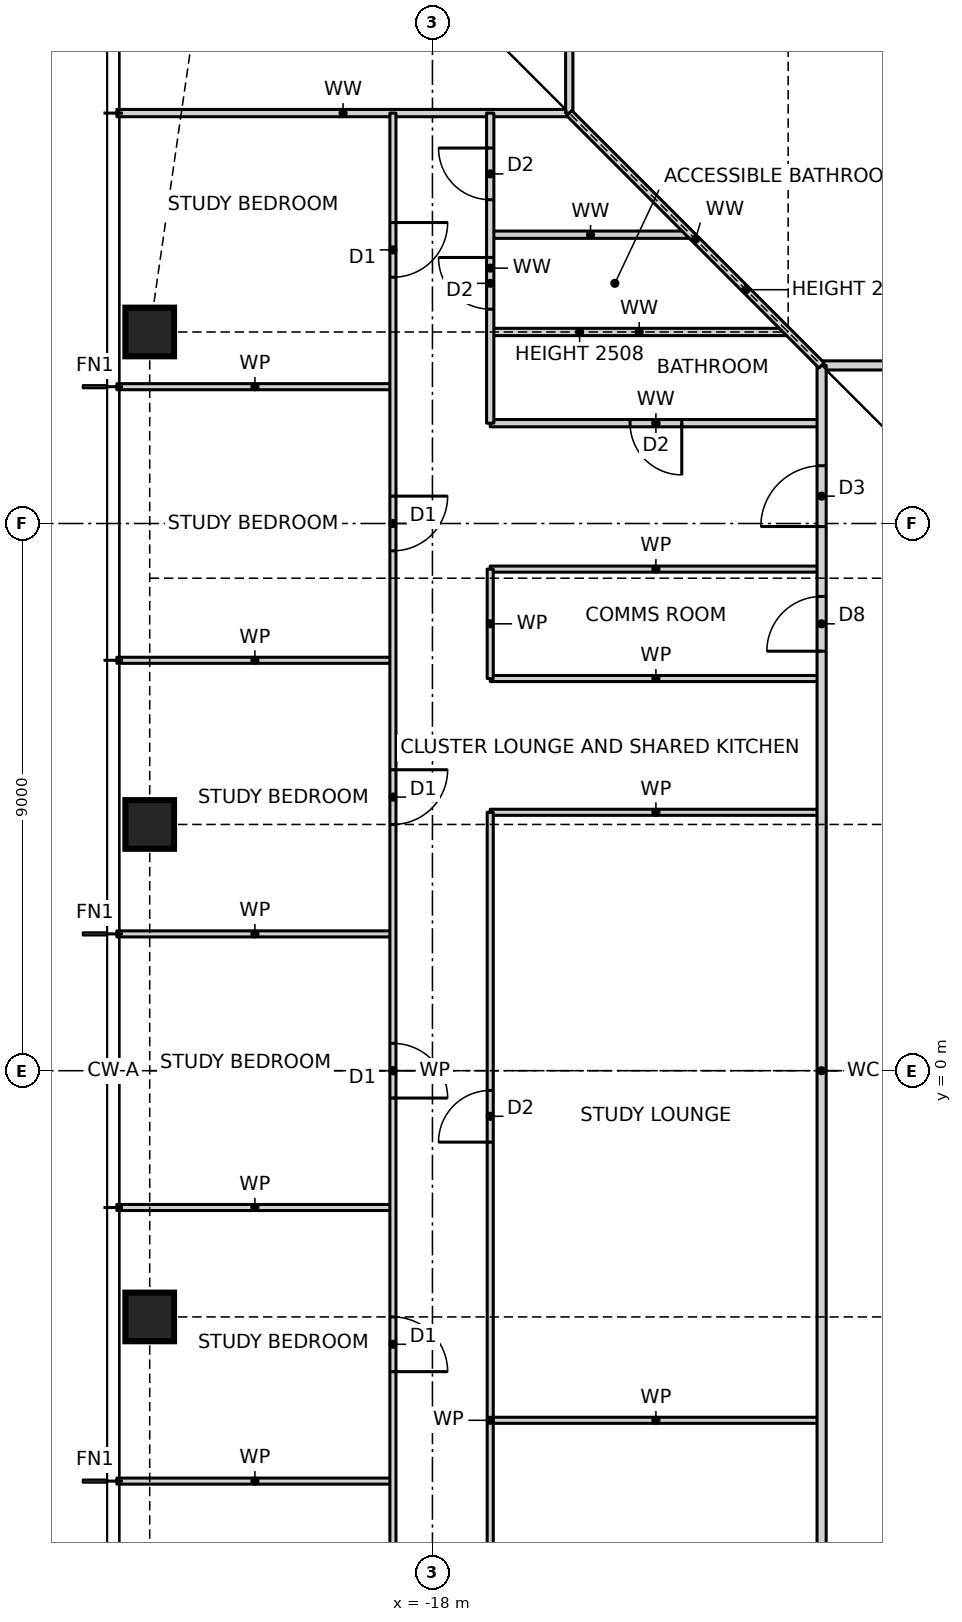
"""IFC4 building model, lengths in metres.
Left out: names, types, materials, properties, quantities, classifications, styles, units other than length and angle.
Written with IfcOpenShell. Run it as: python <this file> out.ifc"""

import sys

from ifc_helpers import new_model, si_unit, direction, frame, frame_2d, origin, origin_2d, place, context, subcontext, project, spatial, rectangle, hollow_rectangle, extrude, element, fill, save


model = new_model("IFC4")
c1 = context("Model", 3, precision=1e-05, world=origin(), true_north=direction((0.0, 1.0)))
c2 = subcontext(c1, "Body", "Model", "MODEL_VIEW")
j1 = project(units=[si_unit("LENGTHUNIT", "METRE"), si_unit("PLANEANGLEUNIT", "RADIAN")], contexts=[c1])
p1 = place(None, origin())
s1 = spatial("IfcSite", under=j1, at=p1, CompositionType="ELEMENT")
p2 = place(p1, origin())
s2 = spatial("IfcBuilding", under=s1, at=p2, CompositionType="ELEMENT")
p3 = place(p2, frame((0.0, 0.0, 29.0)))
s3 = spatial("IfcBuildingStorey", under=s2, at=p3, CompositionType="ELEMENT", Elevation=29.0)
for number, where, z_axis, x_axis in (
    (1, (-22.65, 12.15, 0.0), (0.0, 0.0, 1.0), (1.0, 0.0, 0.0)),
    (2, (-22.65, 4.05, 0.0), (0.0, 0.0, 1.0), (1.0, 0.0, 0.0)),
    (3, (-22.65, -4.05, 0.0), (0.0, 0.0, 1.0), (1.0, 0.0, 0.0)),
):
    element("IfcColumn", number, at=place(p3, frame(where, z_axis=z_axis, x_axis=x_axis)), inside=s3, PredefinedType="COLUMN", context=c2, shape_type="SweptSolid", body=[
        extrude(hollow_rectangle(XDim=0.8, YDim=0.8, WallThickness=0.09, at=origin_2d()), origin(), (0.0, 0.0, 1.0), 3.5),
    ])
p4 = place(p3, frame((-23.19, -6.75, 0.0), z_axis=(0.0, 0.0, 1.0), x_axis=(1.0, 0.0, 0.0)))
e4 = element("IfcWall", 4, at=p4, inside=s3, PredefinedType="PARTITIONING", context=c2, shape_type="SweptSolid", body=[
    extrude(rectangle(XDim=4.54, YDim=0.1, at=frame_2d((2.27, 0.0))), origin(), (0.0, 0.0, 1.0), 3.27),
])
p5 = place(p3, frame((-17.05, -5.75, 0.0), z_axis=(0.0, 0.0, 1.0), x_axis=(1.0, 0.0, 0.0)))
e5 = element("IfcWall", 5, at=p5, inside=s3, PredefinedType="PARTITIONING", context=c2, shape_type="SweptSolid", body=[
    extrude(rectangle(XDim=5.45, YDim=0.1, at=frame_2d((2.725, 0.0))), origin(), (0.0, 0.0, 1.0), 3.27),
])
for number, where, z_axis, x_axis in (
    (6, (-23.19, -2.25, 0.0), (0.0, 0.0, 1.0), (1.0, 0.0, 0.0)),
    (7, (-23.19, 2.25, 0.0), (0.0, 0.0, 1.0), (1.0, 0.0, 0.0)),
):
    element("IfcWall", number, at=place(p3, frame(where, z_axis=z_axis, x_axis=x_axis)), inside=s3, PredefinedType="PARTITIONING", context=c2, shape_type="SweptSolid", body=[
        extrude(rectangle(XDim=4.54, YDim=0.1, at=frame_2d((2.27, 0.0))), origin(), (0.0, 0.0, 1.0), 3.27),
    ])
for number, where, z_axis, x_axis in (
    (8, (-17.05, 4.25, 0.0), (0.0, 0.0, 1.0), (1.0, 0.0, 0.0)),
    (9, (-17.05, 6.45, 0.0), (0.0, 0.0, 1.0), (1.0, 0.0, 0.0)),
):
    element("IfcWall", number, at=place(p3, frame(where, z_axis=z_axis, x_axis=x_axis)), inside=s3, PredefinedType="PARTITIONING", context=c2, shape_type="SweptSolid", body=[
        extrude(rectangle(XDim=5.45, YDim=0.1, at=frame_2d((2.725, 0.0))), origin(), (0.0, 0.0, 1.0), 3.27),
    ])
p6 = place(p3, frame((-23.19, 6.75, 0.0), z_axis=(0.0, 0.0, 1.0), x_axis=(1.0, 0.0, 0.0)))
e10 = element("IfcWall", 10, at=p6, inside=s3, PredefinedType="PARTITIONING", context=c2, shape_type="SweptSolid", body=[
    extrude(rectangle(XDim=4.54, YDim=0.1, at=frame_2d((2.27, 0.0))), origin(), (0.0, 0.0, 1.0), 3.27),
])
p7 = place(p3, frame((-17.05, 8.25, 0.0), z_axis=(0.0, 0.0, 1.0), x_axis=(1.0, 0.0, 0.0)))
e11 = element("IfcWall", 11, at=p7, inside=s3, PredefinedType="PARTITIONING", context=c2, shape_type="SweptSolid", body=[
    extrude(rectangle(XDim=5.45, YDim=0.1, at=frame_2d((2.725, 0.0))), origin(), (0.0, 0.0, 1.0), 3.27),
])
p8 = place(p3, frame((-17.05, 10.65, 0.0), z_axis=(0.0, 0.0, 1.0), x_axis=(1.0, 0.0, 0.0)))
e12 = element("IfcWall", 12, at=p8, inside=s3, PredefinedType="PARTITIONING", context=c2, shape_type="SweptSolid", body=[
    extrude(rectangle(XDim=5.45, YDim=0.12, at=frame_2d((2.725, 0.0))), origin(), (0.0, 0.0, 1.0), 3.27),
])
p9 = place(p8, frame((2.3, 0.0, 0.0)))
e13 = element("IfcOpeningElement", 13, at=p9, cuts=e12, PredefinedType="OPENING", context=c2, shape_type="SweptSolid", body=[
    extrude(rectangle(XDim=0.85, YDim=2.1, at=frame_2d((0.425, 1.05))), frame((0.0, 0.07, 0.0), z_axis=(0.0, -1.0, 0.0), x_axis=(1.0, 0.0, 0.0)), (0.0, 0.0, 1.0), 0.14),
])
p10 = place(p3, frame((-23.19, 11.25, 0.0), z_axis=(0.0, 0.0, 1.0), x_axis=(1.0, 0.0, 0.0)))
e14 = element("IfcWall", 14, at=p10, inside=s3, PredefinedType="PARTITIONING", context=c2, shape_type="SweptSolid", body=[
    extrude(rectangle(XDim=4.54, YDim=0.1, at=frame_2d((2.27, 0.0))), origin(), (0.0, 0.0, 1.0), 3.27),
])
p11 = place(p3, frame((-11.6, 11.6, 0.0), z_axis=(0.0, 0.0, 1.0), x_axis=(1.0, 0.0, 0.0)))
e15 = element("IfcWall", 15, at=p11, inside=s3, PredefinedType="PARTITIONING", context=c2, shape_type="SweptSolid", body=[
    extrude(rectangle(XDim=24.2, YDim=0.15, at=frame_2d((12.1, 0.0))), origin(), (0.0, 0.0, 1.0), 3.27),
])
p12 = place(p11, frame((12.855, 0.0, 0.0)))
e16 = element("IfcOpeningElement", 16, at=p12, cuts=e15, PredefinedType="OPENING", context=c2, shape_type="SweptSolid", body=[
    extrude(rectangle(XDim=1.0, YDim=2.1, at=frame_2d((0.5, 1.05))), frame((0.0, 0.085, 0.0), z_axis=(0.0, -1.0, 0.0), x_axis=(1.0, 0.0, 0.0)), (0.0, 0.0, 1.0), 0.17),
])
p13 = place(p3, frame((-17.05, 12.15, 0.0), z_axis=(0.0, 0.0, 1.0), x_axis=(1.0, 0.0, 0.0)))
e17 = element("IfcWall", 17, at=p13, inside=s3, PredefinedType="PARTITIONING", context=c2, shape_type="SweptSolid", body=[
    extrude(rectangle(XDim=4.9, YDim=0.12, at=frame_2d((2.45, 0.0))), origin(), (0.0, 0.0, 1.0), 2.508),
])
p14 = place(p3, frame((-17.05, 13.75, 0.0), z_axis=(0.0, 0.0, 1.0), x_axis=(1.0, 0.0, 0.0)))
e18 = element("IfcWall", 18, at=p14, inside=s3, PredefinedType="PARTITIONING", context=c2, shape_type="SweptSolid", body=[
    extrude(rectangle(XDim=3.3, YDim=0.12, at=frame_2d((1.65, 0.0))), origin(), (0.0, 0.0, 1.0), 3.27),
])
p15 = place(p3, frame((-23.19, 15.75, 0.0), z_axis=(0.0, 0.0, 1.0), x_axis=(1.0, 0.0, 0.0)))
e19 = element("IfcWall", 19, at=p15, inside=s3, PredefinedType="PARTITIONING", context=c2, shape_type="SweptSolid", body=[
    extrude(rectangle(XDim=7.44, YDim=0.12, at=frame_2d((3.72, 0.0))), origin(), (0.0, 0.0, 1.0), 3.27),
])
p16 = place(p3, frame((-11.6, -11.6, 0.0), z_axis=(0.0, 0.0, 1.0), x_axis=(0.0, 1.0, 0.0)))
e20 = element("IfcWall", 20, at=p16, inside=s3, PredefinedType="PARTITIONING", context=c2, shape_type="SweptSolid", body=[
    extrude(rectangle(XDim=23.2, YDim=0.15, at=frame_2d((11.6, 0.0))), origin(), (0.0, 0.0, 1.0), 3.27),
])
p17 = place(p16, frame((20.55, 0.0, 0.0)))
e21 = element("IfcOpeningElement", 21, at=p17, cuts=e20, PredefinedType="OPENING", context=c2, shape_type="SweptSolid", body=[
    extrude(rectangle(XDim=1.0, YDim=2.1, at=frame_2d((0.5, 1.05))), frame((0.0, 0.085, 0.0), z_axis=(0.0, -1.0, 0.0), x_axis=(1.0, 0.0, 0.0)), (0.0, 0.0, 1.0), 0.17),
])
p18 = place(p16, frame((18.5, 0.0, 0.0)))
e22 = element("IfcOpeningElement", 22, at=p18, cuts=e20, PredefinedType="OPENING", context=c2, shape_type="SweptSolid", body=[
    extrude(rectangle(XDim=0.9, YDim=2.1, at=frame_2d((0.45, 1.05))), frame((0.0, 0.085, 0.0), z_axis=(0.0, -1.0, 0.0), x_axis=(1.0, 0.0, 0.0)), (0.0, 0.0, 1.0), 0.17),
])
p19 = place(p3, frame((-15.75, 15.75, 0.0), z_axis=(0.0, 0.0, 1.0), x_axis=(0.0, 1.0, 0.0)))
e23 = element("IfcWall", 23, at=p19, inside=s3, PredefinedType="PARTITIONING", context=c2, shape_type="SweptSolid", body=[
    extrude(rectangle(XDim=7.44, YDim=0.12, at=frame_2d((3.72, 0.0))), origin(), (0.0, 0.0, 1.0), 3.27),
])
p20 = place(p19, frame((1.675, 0.0, 0.0)))
e24 = element("IfcOpeningElement", 24, at=p20, cuts=e23, PredefinedType="OPENING", context=c2, shape_type="SweptSolid", body=[
    extrude(rectangle(XDim=0.85, YDim=2.1, at=frame_2d((0.425, 1.05))), frame((0.0, 0.07, 0.0), z_axis=(0.0, -1.0, 0.0), x_axis=(1.0, 0.0, 0.0)), (0.0, 0.0, 1.0), 0.14),
])
p21 = place(p3, frame((-17.05, -15.75, 0.0), z_axis=(0.0, 0.0, 1.0), x_axis=(0.0, 1.0, 0.0)))
e25 = element("IfcWall", 25, at=p21, inside=s3, PredefinedType="PARTITIONING", context=c2, shape_type="SweptSolid", body=[
    extrude(rectangle(XDim=20.0, YDim=0.1, at=frame_2d((10.0, 0.0))), origin(), (0.0, 0.0, 1.0), 3.27),
])
p22 = place(p21, frame((14.575, 0.0, 0.0)))
e26 = element("IfcOpeningElement", 26, at=p22, cuts=e25, PredefinedType="OPENING", context=c2, shape_type="SweptSolid", body=[
    extrude(rectangle(XDim=0.85, YDim=2.1, at=frame_2d((0.425, 1.05))), frame((0.0, 0.06, 0.0), z_axis=(0.0, -1.0, 0.0), x_axis=(1.0, 0.0, 0.0)), (0.0, 0.0, 1.0), 0.12),
])
p23 = place(p21, frame((4.575, 0.0, 0.0)))
e27 = element("IfcOpeningElement", 27, at=p23, cuts=e25, PredefinedType="OPENING", context=c2, shape_type="SweptSolid", body=[
    extrude(rectangle(XDim=0.85, YDim=2.1, at=frame_2d((0.425, 1.05))), frame((0.0, 0.06, 0.0), z_axis=(0.0, -1.0, 0.0), x_axis=(1.0, 0.0, 0.0)), (0.0, 0.0, 1.0), 0.12),
])
p24 = place(p3, frame((-17.05, 6.45, 0.0), z_axis=(0.0, 0.0, 1.0), x_axis=(0.0, 1.0, 0.0)))
e28 = element("IfcWall", 28, at=p24, inside=s3, PredefinedType="PARTITIONING", context=c2, shape_type="SweptSolid", body=[
    extrude(rectangle(XDim=1.8, YDim=0.1, at=frame_2d((0.9, 0.0))), origin(), (0.0, 0.0, 1.0), 3.27),
])
p25 = place(p3, frame((-17.05, 10.65, 0.0), z_axis=(0.0, 0.0, 1.0), x_axis=(0.0, 1.0, 0.0)))
e29 = element("IfcWall", 29, at=p25, inside=s3, PredefinedType="PARTITIONING", context=c2, shape_type="SweptSolid", body=[
    extrude(rectangle(XDim=5.1, YDim=0.12, at=frame_2d((2.55, 0.0))), origin(), (0.0, 0.0, 1.0), 3.27),
])
p26 = place(p25, frame((3.675, 0.0, 0.0)))
e30 = element("IfcOpeningElement", 30, at=p26, cuts=e29, PredefinedType="OPENING", context=c2, shape_type="SweptSolid", body=[
    extrude(rectangle(XDim=0.85, YDim=2.1, at=frame_2d((0.425, 1.05))), frame((0.0, 0.07, 0.0), z_axis=(0.0, -1.0, 0.0), x_axis=(1.0, 0.0, 0.0)), (0.0, 0.0, 1.0), 0.14),
])
p27 = place(p25, frame((1.875, 0.0, 0.0)))
e31 = element("IfcOpeningElement", 31, at=p27, cuts=e29, PredefinedType="OPENING", context=c2, shape_type="SweptSolid", body=[
    extrude(rectangle(XDim=0.85, YDim=2.1, at=frame_2d((0.425, 1.05))), frame((0.0, 0.07, 0.0), z_axis=(0.0, -1.0, 0.0), x_axis=(1.0, 0.0, 0.0)), (0.0, 0.0, 1.0), 0.14),
])
p28 = place(p3, frame((-18.65, -15.75, 0.0), z_axis=(0.0, 0.0, 1.0), x_axis=(0.0, 1.0, 0.0)))
e32 = element("IfcWall", 32, at=p28, inside=s3, PredefinedType="PARTITIONING", context=c2, shape_type="SweptSolid", body=[
    extrude(rectangle(XDim=31.5, YDim=0.1, at=frame_2d((15.75, 0.0))), origin(), (0.0, 0.0, 1.0), 3.27),
])
p29 = place(p28, frame((28.8, 0.0, 0.0)))
e33 = element("IfcOpeningElement", 33, at=p29, cuts=e32, PredefinedType="OPENING", context=c2, shape_type="SweptSolid", body=[
    extrude(rectangle(XDim=0.9, YDim=2.1, at=frame_2d((0.45, 1.05))), frame((0.0, 0.06, 0.0), z_axis=(0.0, -1.0, 0.0), x_axis=(1.0, 0.0, 0.0)), (0.0, 0.0, 1.0), 0.12),
])
p30 = place(p28, frame((24.3, 0.0, 0.0)))
e34 = element("IfcOpeningElement", 34, at=p30, cuts=e32, PredefinedType="OPENING", context=c2, shape_type="SweptSolid", body=[
    extrude(rectangle(XDim=0.9, YDim=2.1, at=frame_2d((0.45, 1.05))), frame((0.0, 0.06, 0.0), z_axis=(0.0, -1.0, 0.0), x_axis=(1.0, 0.0, 0.0)), (0.0, 0.0, 1.0), 0.12),
])
p31 = place(p28, frame((19.8, 0.0, 0.0)))
e35 = element("IfcOpeningElement", 35, at=p31, cuts=e32, PredefinedType="OPENING", context=c2, shape_type="SweptSolid", body=[
    extrude(rectangle(XDim=0.9, YDim=2.1, at=frame_2d((0.45, 1.05))), frame((0.0, 0.06, 0.0), z_axis=(0.0, -1.0, 0.0), x_axis=(1.0, 0.0, 0.0)), (0.0, 0.0, 1.0), 0.12),
])
p32 = place(p28, frame((15.3, 0.0, 0.0)))
e36 = element("IfcOpeningElement", 36, at=p32, cuts=e32, PredefinedType="OPENING", context=c2, shape_type="SweptSolid", body=[
    extrude(rectangle(XDim=0.9, YDim=2.1, at=frame_2d((0.45, 1.05))), frame((0.0, 0.06, 0.0), z_axis=(0.0, -1.0, 0.0), x_axis=(1.0, 0.0, 0.0)), (0.0, 0.0, 1.0), 0.12),
])
p33 = place(p28, frame((10.8, 0.0, 0.0)))
e37 = element("IfcOpeningElement", 37, at=p33, cuts=e32, PredefinedType="OPENING", context=c2, shape_type="SweptSolid", body=[
    extrude(rectangle(XDim=0.9, YDim=2.1, at=frame_2d((0.45, 1.05))), frame((0.0, 0.06, 0.0), z_axis=(0.0, -1.0, 0.0), x_axis=(1.0, 0.0, 0.0)), (0.0, 0.0, 1.0), 0.12),
])
p34 = place(p28, frame((6.3, 0.0, 0.0)))
e38 = element("IfcOpeningElement", 38, at=p34, cuts=e32, PredefinedType="OPENING", context=c2, shape_type="SweptSolid", body=[
    extrude(rectangle(XDim=0.9, YDim=2.1, at=frame_2d((0.45, 1.05))), frame((0.0, 0.06, 0.0), z_axis=(0.0, -1.0, 0.0), x_axis=(1.0, 0.0, 0.0)), (0.0, 0.0, 1.0), 0.12),
])
p35 = place(p28, frame((1.8, 0.0, 0.0)))
e39 = element("IfcOpeningElement", 39, at=p35, cuts=e32, PredefinedType="OPENING", context=c2, shape_type="SweptSolid", body=[
    extrude(rectangle(XDim=0.9, YDim=2.1, at=frame_2d((0.45, 1.05))), frame((0.0, 0.06, 0.0), z_axis=(0.0, -1.0, 0.0), x_axis=(1.0, 0.0, 0.0)), (0.0, 0.0, 1.0), 0.12),
])
p36 = place(p3, frame((-11.6, 11.6, 0.0), z_axis=(0.0, 0.0, 1.0), x_axis=(-0.707106781187, 0.707106781187, 0.0)))
e40 = element("IfcWall", 40, at=p36, inside=s3, PredefinedType="PARTITIONING", context=c2, shape_type="SweptSolid", body=[
    extrude(rectangle(XDim=5.869, YDim=0.12, at=frame_2d((2.935, 0.0))), origin(), (0.0, 0.0, 1.0), 2.343),
])
p37 = place(p29, frame((0.9, 0.0, 0.0), z_axis=(0.0, 0.0, 1.0), x_axis=(-1.0, 0.0, 0.0)))
e41 = element("IfcDoor", 41, at=p37, inside=s3, OperationType="SINGLE_SWING_LEFT", PredefinedType="DOOR", context=c2, shape_type="SweptSolid", body=[
    extrude(rectangle(XDim=0.9, YDim=2.1, at=frame_2d((0.45, 1.05))), frame((0.0, 0.025, 0.0), z_axis=(0.0, -1.0, 0.0), x_axis=(1.0, 0.0, 0.0)), (0.0, 0.0, 1.0), 0.05),
])
fill(e33, e41)
p38 = place(p30, frame((0.9, 0.0, 0.0), z_axis=(0.0, 0.0, 1.0), x_axis=(-1.0, 0.0, 0.0)))
e42 = element("IfcDoor", 42, at=p38, inside=s3, OperationType="SINGLE_SWING_LEFT", PredefinedType="DOOR", context=c2, shape_type="SweptSolid", body=[
    extrude(rectangle(XDim=0.9, YDim=2.1, at=frame_2d((0.45, 1.05))), frame((0.0, 0.025, 0.0), z_axis=(0.0, -1.0, 0.0), x_axis=(1.0, 0.0, 0.0)), (0.0, 0.0, 1.0), 0.05),
])
fill(e34, e42)
p39 = place(p31, frame((0.9, 0.0, 0.0), z_axis=(0.0, 0.0, 1.0), x_axis=(-1.0, 0.0, 0.0)))
e43 = element("IfcDoor", 43, at=p39, inside=s3, OperationType="SINGLE_SWING_LEFT", PredefinedType="DOOR", context=c2, shape_type="SweptSolid", body=[
    extrude(rectangle(XDim=0.9, YDim=2.1, at=frame_2d((0.45, 1.05))), frame((0.0, 0.025, 0.0), z_axis=(0.0, -1.0, 0.0), x_axis=(1.0, 0.0, 0.0)), (0.0, 0.0, 1.0), 0.05),
])
fill(e35, e43)
p40 = place(p32, frame((0.9, 0.0, 0.0), z_axis=(0.0, 0.0, 1.0), x_axis=(-1.0, 0.0, 0.0)))
e44 = element("IfcDoor", 44, at=p40, inside=s3, OperationType="SINGLE_SWING_RIGHT", PredefinedType="DOOR", context=c2, shape_type="SweptSolid", body=[
    extrude(rectangle(XDim=0.9, YDim=2.1, at=frame_2d((0.45, 1.05))), frame((0.0, 0.025, 0.0), z_axis=(0.0, -1.0, 0.0), x_axis=(1.0, 0.0, 0.0)), (0.0, 0.0, 1.0), 0.05),
])
fill(e36, e44)
p41 = place(p33, frame((0.9, 0.0, 0.0), z_axis=(0.0, 0.0, 1.0), x_axis=(-1.0, 0.0, 0.0)))
e45 = element("IfcDoor", 45, at=p41, inside=s3, OperationType="SINGLE_SWING_RIGHT", PredefinedType="DOOR", context=c2, shape_type="SweptSolid", body=[
    extrude(rectangle(XDim=0.9, YDim=2.1, at=frame_2d((0.45, 1.05))), frame((0.0, 0.025, 0.0), z_axis=(0.0, -1.0, 0.0), x_axis=(1.0, 0.0, 0.0)), (0.0, 0.0, 1.0), 0.05),
])
fill(e37, e45)
p42 = place(p17, origin())
e46 = element("IfcDoor", 46, at=p42, inside=s3, OperationType="SINGLE_SWING_LEFT", PredefinedType="DOOR", context=c2, shape_type="SweptSolid", body=[
    extrude(rectangle(XDim=1.0, YDim=2.1, at=frame_2d((0.5, 1.05))), frame((0.0, 0.025, 0.0), z_axis=(0.0, -1.0, 0.0), x_axis=(1.0, 0.0, 0.0)), (0.0, 0.0, 1.0), 0.05),
])
fill(e21, e46)
p43 = place(p26, origin())
e47 = element("IfcDoor", 47, at=p43, inside=s3, OperationType="SINGLE_SWING_RIGHT", PredefinedType="DOOR", context=c2, shape_type="SweptSolid", body=[
    extrude(rectangle(XDim=0.85, YDim=2.1, at=frame_2d((0.425, 1.05))), frame((0.0, 0.025, 0.0), z_axis=(0.0, -1.0, 0.0), x_axis=(1.0, 0.0, 0.0)), (0.0, 0.0, 1.0), 0.05),
])
fill(e30, e47)
p44 = place(p27, origin())
e48 = element("IfcDoor", 48, at=p44, inside=s3, OperationType="SINGLE_SWING_RIGHT", PredefinedType="DOOR", context=c2, shape_type="SweptSolid", body=[
    extrude(rectangle(XDim=0.85, YDim=2.1, at=frame_2d((0.425, 1.05))), frame((0.0, 0.025, 0.0), z_axis=(0.0, -1.0, 0.0), x_axis=(1.0, 0.0, 0.0)), (0.0, 0.0, 1.0), 0.05),
])
fill(e31, e48)
p45 = place(p9, frame((0.85, 0.0, 0.0), z_axis=(0.0, 0.0, 1.0), x_axis=(-1.0, 0.0, 0.0)))
e49 = element("IfcDoor", 49, at=p45, inside=s3, OperationType="SINGLE_SWING_LEFT", PredefinedType="DOOR", context=c2, shape_type="SweptSolid", body=[
    extrude(rectangle(XDim=0.85, YDim=2.1, at=frame_2d((0.425, 1.05))), frame((0.0, 0.025, 0.0), z_axis=(0.0, -1.0, 0.0), x_axis=(1.0, 0.0, 0.0)), (0.0, 0.0, 1.0), 0.05),
])
fill(e13, e49)
p46 = place(p18, origin())
e50 = element("IfcDoor", 50, at=p46, inside=s3, OperationType="SINGLE_SWING_LEFT", PredefinedType="DOOR", context=c2, shape_type="SweptSolid", body=[
    extrude(rectangle(XDim=0.9, YDim=2.1, at=frame_2d((0.45, 1.05))), frame((0.0, 0.025, 0.0), z_axis=(0.0, -1.0, 0.0), x_axis=(1.0, 0.0, 0.0)), (0.0, 0.0, 1.0), 0.05),
])
fill(e22, e50)
p47 = place(p22, origin())
e51 = element("IfcDoor", 51, at=p47, inside=s3, OperationType="SINGLE_SWING_LEFT", PredefinedType="DOOR", context=c2, shape_type="SweptSolid", body=[
    extrude(rectangle(XDim=0.85, YDim=2.1, at=frame_2d((0.425, 1.05))), frame((0.0, 0.025, 0.0), z_axis=(0.0, -1.0, 0.0), x_axis=(1.0, 0.0, 0.0)), (0.0, 0.0, 1.0), 0.05),
])
fill(e26, e51)
save(model, sys.argv[1])
